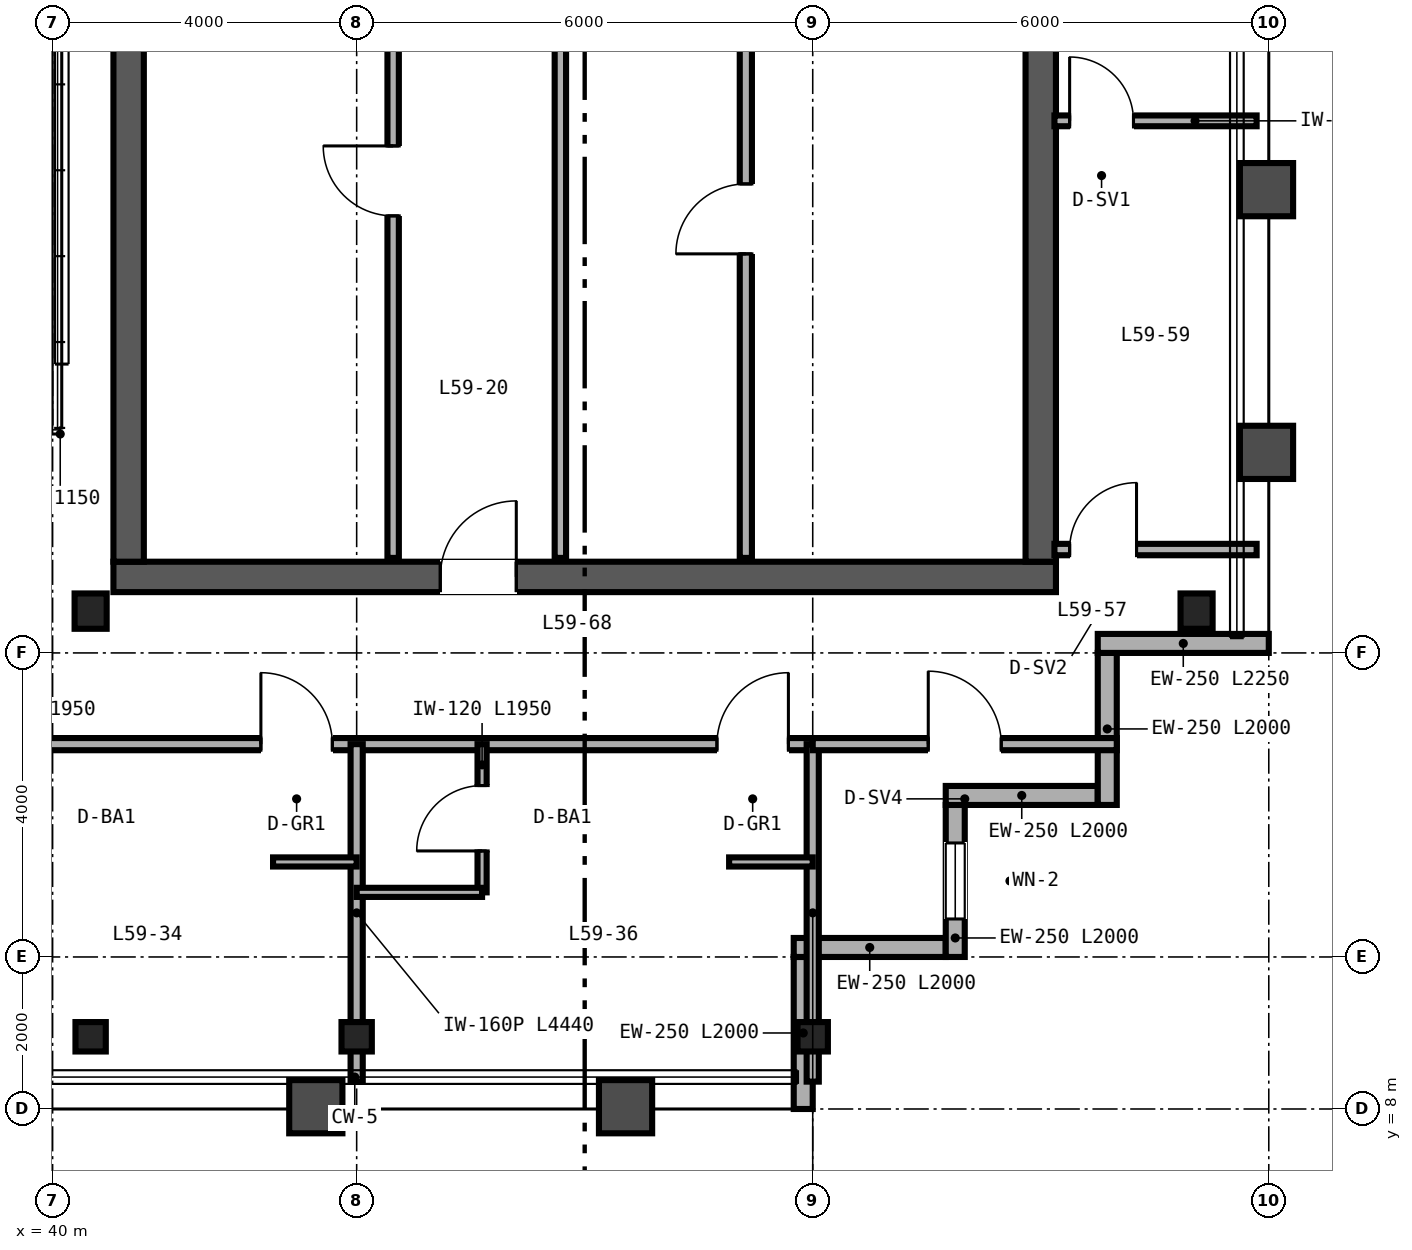
"""IFC4 building model, lengths in metres.
Left out: names, types, materials, properties, quantities, classifications, styles, units other than length and angle.
Written with IfcOpenShell. Run it as: python <this file> out.ifc"""

import sys

from ifc_helpers import new_model, si_unit, direction, frame, frame_2d, origin, origin_2d, place, context, subcontext, project, spatial, rectangle, i_section, extrude, source, transform, mapped, element, fill, save


model = new_model("IFC4")
c1 = context("Model", 3, precision=1e-05, world=origin(), true_north=direction((0.0, 1.0)))
c2 = subcontext(c1, "Body", "Model", "MODEL_VIEW")
j1 = project(units=[si_unit("LENGTHUNIT", "METRE"), si_unit("PLANEANGLEUNIT", "RADIAN")], contexts=[c1])
p1 = place(None, origin())
s1 = spatial("IfcSite", under=j1, at=p1, CompositionType="ELEMENT")
p2 = place(p1, origin())
s2 = spatial("IfcBuilding", under=s1, at=p2, CompositionType="ELEMENT")
p3 = place(p2, frame((0.0, 0.0, 236.4)))
s3 = spatial("IfcBuildingStorey", under=s2, at=p3, CompositionType="ELEMENT", Elevation=236.4)
p4 = place(p3, frame((40.8, 15.0, 0.0), z_axis=(0.0, 0.0, 1.0), x_axis=(1.0, 0.0, 0.0)))
e1 = element("IfcWall", 1, at=p4, inside=s3, PredefinedType="SHEAR", context=c2, shape_type="SweptSolid", body=[
    extrude(rectangle(XDim=12.4, YDim=0.4, at=frame_2d((6.2, 0.0))), origin(), (0.0, 0.0, 1.0), 3.38),
])
p5 = place(p4, frame((4.3, 0.0, 0.0)))
e2 = element("IfcOpeningElement", 2, at=p5, cuts=e1, PredefinedType="OPENING", context=c2, shape_type="SweptSolid", body=[
    extrude(rectangle(XDim=1.0, YDim=2.15, at=frame_2d((0.5, 1.075))), frame((0.0, 0.21, 0.0), z_axis=(0.0, -1.0, 0.0), x_axis=(1.0, 0.0, 0.0)), (0.0, 0.0, 1.0), 0.42),
])
for number, where, z_axis, x_axis in (
    (3, (41.0, 15.2, 0.0), (0.0, 0.0, 1.0), (0.0, 1.0, 0.0)),
    (4, (53.0, 15.2, 0.0), (0.0, 0.0, 1.0), (0.0, 1.0, 0.0)),
):
    element("IfcWall", number, at=place(p3, frame(where, z_axis=z_axis, x_axis=x_axis)), inside=s3, PredefinedType="SHEAR", context=c2, shape_type="SweptSolid", body=[
        extrude(rectangle(XDim=21.6, YDim=0.4, at=frame_2d((10.8, 0.0))), origin(), (0.0, 0.0, 1.0), 3.38),
    ])
m1 = source(origin(), c2, "Body", "SweptSolid", [
    extrude(i_section(OverallWidth=0.422, OverallDepth=0.465, WebThickness=0.045, FlangeThickness=0.073, FilletRadius=0.025, at=origin_2d()), origin(), (0.0, 0.0, 1.0), 3.38),
])
for number, where, z_axis, x_axis in (
    (5, (40.5, 14.55, 0.0), (0.0, 0.0, 1.0), (1.0, 0.0, 0.0)),
    (6, (55.05, 14.55, 0.0), (0.0, 0.0, 1.0), (1.0, 0.0, 0.0)),
):
    element("IfcColumn", number, at=place(p3, frame(where, z_axis=z_axis, x_axis=x_axis)), inside=s3, PredefinedType="COLUMN", context=c2, shape_type="MappedRepresentation", body=[
        mapped(m1, transform((0.0, 0.0, 0.0), scale=1.0)),
    ])
m2 = source(origin(), c2, "Body", "SweptSolid", [
    extrude(i_section(OverallWidth=0.399, OverallDepth=0.387, WebThickness=0.021, FlangeThickness=0.033, FilletRadius=0.025, at=origin_2d()), origin(), (0.0, 0.0, 1.0), 3.38),
])
for number, where, z_axis, x_axis in (
    (7, (40.5, 8.95, 0.0), (0.0, 0.0, 1.0), (1.0, 0.0, 0.0)),
    (8, (44.0, 8.95, 0.0), (0.0, 0.0, 1.0), (1.0, 0.0, 0.0)),
    (9, (50.0, 8.95, 0.0), (0.0, 0.0, 1.0), (1.0, 0.0, 0.0)),
):
    element("IfcColumn", number, at=place(p3, frame(where, z_axis=z_axis, x_axis=x_axis)), inside=s3, PredefinedType="COLUMN", context=c2, shape_type="MappedRepresentation", body=[
        mapped(m2, transform((0.0, 0.0, 0.0), scale=1.0)),
    ])
p6 = place(p3, frame((49.875, 8.0, 0.0), z_axis=(0.0, 0.0, 1.0), x_axis=(0.0, 1.0, 0.0)))
e10 = element("IfcWall", 10, at=p6, inside=s3, PredefinedType="SOLIDWALL", context=c2, shape_type="SweptSolid", body=[
    extrude(rectangle(XDim=2.0, YDim=0.25, at=frame_2d((1.0, 0.0))), origin(), (0.0, 0.0, 1.0), 2.687),
])
p7 = place(p3, frame((49.75, 10.125, 0.0), z_axis=(0.0, 0.0, 1.0), x_axis=(1.0, 0.0, 0.0)))
e11 = element("IfcWall", 11, at=p7, inside=s3, PredefinedType="SOLIDWALL", context=c2, shape_type="SweptSolid", body=[
    extrude(rectangle(XDim=2.0, YDim=0.25, at=frame_2d((1.0, 0.0))), origin(), (0.0, 0.0, 1.0), 3.38),
])
p8 = place(p3, frame((51.875, 10.0, 0.0), z_axis=(0.0, 0.0, 1.0), x_axis=(0.0, 1.0, 0.0)))
e12 = element("IfcWall", 12, at=p8, inside=s3, PredefinedType="SOLIDWALL", context=c2, shape_type="SweptSolid", body=[
    extrude(rectangle(XDim=2.0, YDim=0.25, at=frame_2d((1.0, 0.0))), origin(), (0.0, 0.0, 1.0), 3.38),
])
p9 = place(p8, frame((0.5, 0.0, 0.85)))
e13 = element("IfcOpeningElement", 13, at=p9, cuts=e12, PredefinedType="OPENING", context=c2, shape_type="SweptSolid", body=[
    extrude(rectangle(XDim=1.0, YDim=1.9, at=frame_2d((0.5, 0.95))), frame((0.0, 0.135, 0.0), z_axis=(0.0, -1.0, 0.0), x_axis=(1.0, 0.0, 0.0)), (0.0, 0.0, 1.0), 0.27),
])
for number, where, z_axis, x_axis in (
    (14, (51.75, 12.125, 0.0), (0.0, 0.0, 1.0), (1.0, 0.0, 0.0)),
    (15, (53.875, 12.0, 0.0), (0.0, 0.0, 1.0), (0.0, 1.0, 0.0)),
):
    element("IfcWall", number, at=place(p3, frame(where, z_axis=z_axis, x_axis=x_axis)), inside=s3, PredefinedType="SOLIDWALL", context=c2, shape_type="SweptSolid", body=[
        extrude(rectangle(XDim=2.0, YDim=0.25, at=frame_2d((1.0, 0.0))), origin(), (0.0, 0.0, 1.0), 3.38),
    ])
p10 = place(p3, frame((53.75, 14.125, 0.0), z_axis=(0.0, 0.0, 1.0), x_axis=(1.0, 0.0, 0.0)))
e16 = element("IfcWall", 16, at=p10, inside=s3, PredefinedType="SOLIDWALL", context=c2, shape_type="SweptSolid", body=[
    extrude(rectangle(XDim=2.25, YDim=0.25, at=frame_2d((1.125, 0.0))), origin(), (0.0, 0.0, 1.0), 3.38),
])
p11 = place(p3, frame((46.68, 15.25, 0.0), z_axis=(0.0, 0.0, 1.0), x_axis=(0.0, 1.0, 0.0)))
e17 = element("IfcWall", 17, at=p11, inside=s3, PredefinedType="PARTITIONING", context=c2, shape_type="SweptSolid", body=[
    extrude(rectangle(XDim=16.13, YDim=0.15, at=frame_2d((8.065, 0.0))), origin(), (0.0, 0.0, 1.0), 2.453),
])
p12 = place(p11, frame((7.5, 0.0, 0.0)))
e18 = element("IfcOpeningElement", 18, at=p12, cuts=e17, PredefinedType="OPENING", context=c2, shape_type="SweptSolid", body=[
    extrude(rectangle(XDim=0.9, YDim=2.15, at=frame_2d((0.45, 1.075))), frame((0.0, 0.085, 0.0), z_axis=(0.0, -1.0, 0.0), x_axis=(1.0, 0.0, 0.0)), (0.0, 0.0, 1.0), 0.17),
])
p13 = place(p3, frame((49.12, 15.25, 0.0), z_axis=(0.0, 0.0, 1.0), x_axis=(0.0, 1.0, 0.0)))
e19 = element("IfcWall", 19, at=p13, inside=s3, PredefinedType="PARTITIONING", context=c2, shape_type="SweptSolid", body=[
    extrude(rectangle(XDim=16.13, YDim=0.16, at=frame_2d((8.065, 0.0))), origin(), (0.0, 0.0, 1.0), 2.453),
])
p14 = place(p13, frame((4.0, 0.0, 0.0)))
e20 = element("IfcOpeningElement", 20, at=p14, cuts=e19, PredefinedType="OPENING", context=c2, shape_type="SweptSolid", body=[
    extrude(rectangle(XDim=0.92, YDim=2.15, at=frame_2d((0.46, 1.075))), frame((0.0, 0.09, 0.0), z_axis=(0.0, -1.0, 0.0), x_axis=(1.0, 0.0, 0.0)), (0.0, 0.0, 1.0), 0.18),
])
p15 = place(p13, frame((12.0, 0.0, 0.0)))
e21 = element("IfcOpeningElement", 21, at=p15, cuts=e19, PredefinedType="OPENING", context=c2, shape_type="SweptSolid", body=[
    extrude(rectangle(XDim=0.92, YDim=2.15, at=frame_2d((0.46, 1.075))), frame((0.0, 0.09, 0.0), z_axis=(0.0, -1.0, 0.0), x_axis=(1.0, 0.0, 0.0)), (0.0, 0.0, 1.0), 0.18),
])
p16 = place(p3, frame((44.48, 15.25, 0.0), z_axis=(0.0, 0.0, 1.0), x_axis=(0.0, 1.0, 0.0)))
e22 = element("IfcWall", 22, at=p16, inside=s3, PredefinedType="PARTITIONING", context=c2, shape_type="SweptSolid", body=[
    extrude(rectangle(XDim=16.13, YDim=0.15, at=frame_2d((8.065, 0.0))), origin(), (0.0, 0.0, 1.0), 2.453),
])
p17 = place(p16, frame((4.5, 0.0, 0.0)))
e23 = element("IfcOpeningElement", 23, at=p17, cuts=e22, PredefinedType="OPENING", context=c2, shape_type="SweptSolid", body=[
    extrude(rectangle(XDim=0.92, YDim=2.15, at=frame_2d((0.46, 1.075))), frame((0.0, 0.085, 0.0), z_axis=(0.0, -1.0, 0.0), x_axis=(1.0, 0.0, 0.0)), (0.0, 0.0, 1.0), 0.17),
])
p18 = place(p3, frame((38.0, 12.8, 0.0), z_axis=(0.0, 0.0, 1.0), x_axis=(1.0, 0.0, 0.0)))
e24 = element("IfcWall", 24, at=p18, inside=s3, PredefinedType="PARTITIONING", context=c2, shape_type="SweptSolid", body=[
    extrude(rectangle(XDim=12.0, YDim=0.16, at=frame_2d((6.0, 0.0))), origin(), (0.0, 0.0, 1.0), 2.923),
])
p19 = place(p18, frame((4.74, 0.0, 0.0)))
e25 = element("IfcOpeningElement", 25, at=p19, cuts=e24, PredefinedType="OPENING", context=c2, shape_type="SweptSolid", body=[
    extrude(rectangle(XDim=0.94, YDim=2.15, at=frame_2d((0.47, 1.075))), frame((0.0, 0.09, 0.0), z_axis=(0.0, -1.0, 0.0), x_axis=(1.0, 0.0, 0.0)), (0.0, 0.0, 1.0), 0.18),
])
p20 = place(p18, frame((10.74, 0.0, 0.0)))
e26 = element("IfcOpeningElement", 26, at=p20, cuts=e24, PredefinedType="OPENING", context=c2, shape_type="SweptSolid", body=[
    extrude(rectangle(XDim=0.94, YDim=2.15, at=frame_2d((0.47, 1.075))), frame((0.0, 0.09, 0.0), z_axis=(0.0, -1.0, 0.0), x_axis=(1.0, 0.0, 0.0)), (0.0, 0.0, 1.0), 0.18),
])
for number, where, z_axis, x_axis in (
    (27, (50.0, 8.36, 0.0), (0.0, 0.0, 1.0), (0.0, 1.0, 0.0)),
    (28, (44.0, 8.36, 0.0), (0.0, 0.0, 1.0), (0.0, 1.0, 0.0)),
):
    element("IfcWall", number, at=place(p3, frame(where, z_axis=z_axis, x_axis=x_axis)), inside=s3, PredefinedType="PARTITIONING", context=c2, shape_type="SweptSolid", body=[
        extrude(rectangle(XDim=4.44, YDim=0.16, at=frame_2d((2.22, 0.0))), origin(), (0.0, 0.0, 1.0), 2.687),
    ])
p21 = place(p3, frame((42.9, 11.25, 0.0), z_axis=(0.0, 0.0, 1.0), x_axis=(1.0, 0.0, 0.0)))
e29 = element("IfcWall", 29, at=p21, inside=s3, PredefinedType="PARTITIONING", context=c2, shape_type="SweptSolid", body=[
    extrude(rectangle(XDim=1.1, YDim=0.12, at=frame_2d((0.55, 0.0))), origin(), (0.0, 0.0, 1.0), 3.38),
])
p22 = place(p3, frame((45.65, 10.85, 0.0), z_axis=(0.0, 0.0, 1.0), x_axis=(0.0, 1.0, 0.0)))
e30 = element("IfcWall", 30, at=p22, inside=s3, PredefinedType="PARTITIONING", context=c2, shape_type="SweptSolid", body=[
    extrude(rectangle(XDim=1.95, YDim=0.12, at=frame_2d((0.975, 0.0))), origin(), (0.0, 0.0, 1.0), 3.38),
])
p23 = place(p22, frame((0.545, 0.0, 0.0)))
e31 = element("IfcOpeningElement", 31, at=p23, cuts=e30, PredefinedType="OPENING", context=c2, shape_type="SweptSolid", body=[
    extrude(rectangle(XDim=0.86, YDim=2.1, at=frame_2d((0.43, 1.05))), frame((0.0, 0.07, 0.0), z_axis=(0.0, -1.0, 0.0), x_axis=(1.0, 0.0, 0.0)), (0.0, 0.0, 1.0), 0.14),
])
p24 = place(p3, frame((44.0, 10.85, 0.0), z_axis=(0.0, 0.0, 1.0), x_axis=(1.0, 0.0, 0.0)))
e32 = element("IfcWall", 32, at=p24, inside=s3, PredefinedType="PARTITIONING", context=c2, shape_type="SweptSolid", body=[
    extrude(rectangle(XDim=1.65, YDim=0.12, at=frame_2d((0.825, 0.0))), origin(), (0.0, 0.0, 1.0), 3.38),
])
p25 = place(p3, frame((48.9, 11.25, 0.0), z_axis=(0.0, 0.0, 1.0), x_axis=(1.0, 0.0, 0.0)))
e33 = element("IfcWall", 33, at=p25, inside=s3, PredefinedType="PARTITIONING", context=c2, shape_type="SweptSolid", body=[
    extrude(rectangle(XDim=1.1, YDim=0.12, at=frame_2d((0.55, 0.0))), origin(), (0.0, 0.0, 1.0), 3.38),
])
p26 = place(p3, frame((53.18, 15.36, 0.0), z_axis=(0.0, 0.0, 1.0), x_axis=(1.0, 0.0, 0.0)))
e34 = element("IfcWall", 34, at=p26, inside=s3, PredefinedType="PARTITIONING", context=c2, shape_type="SweptSolid", body=[
    extrude(rectangle(XDim=2.66, YDim=0.15, at=frame_2d((1.33, 0.0))), origin(), (0.0, 0.0, 1.0), 2.601),
])
p27 = place(p26, frame((0.2, 0.0, 0.0)))
e35 = element("IfcOpeningElement", 35, at=p27, cuts=e34, PredefinedType="OPENING", context=c2, shape_type="SweptSolid", body=[
    extrude(rectangle(XDim=0.88, YDim=2.15, at=frame_2d((0.44, 1.075))), frame((0.0, 0.085, 0.0), z_axis=(0.0, -1.0, 0.0), x_axis=(1.0, 0.0, 0.0)), (0.0, 0.0, 1.0), 0.17),
])
p28 = place(p3, frame((53.18, 21.0, 0.0), z_axis=(0.0, 0.0, 1.0), x_axis=(1.0, 0.0, 0.0)))
e36 = element("IfcWall", 36, at=p28, inside=s3, PredefinedType="PARTITIONING", context=c2, shape_type="SweptSolid", body=[
    extrude(rectangle(XDim=2.66, YDim=0.142, at=frame_2d((1.33, 0.0))), origin(), (0.0, 0.0, 1.0), 2.601),
])
p29 = place(p28, frame((0.2, 0.0, 0.0)))
e37 = element("IfcOpeningElement", 37, at=p29, cuts=e36, PredefinedType="OPENING", context=c2, shape_type="SweptSolid", body=[
    extrude(rectangle(XDim=0.84, YDim=2.1, at=frame_2d((0.42, 1.05))), frame((0.0, 0.081, 0.0), z_axis=(0.0, -1.0, 0.0), x_axis=(1.0, 0.0, 0.0)), (0.0, 0.0, 1.0), 0.162),
])
p30 = place(p3, frame((50.0, 12.8, 0.0), z_axis=(0.0, 0.0, 1.0), x_axis=(1.0, 0.0, 0.0)))
e38 = element("IfcWall", 38, at=p30, inside=s3, PredefinedType="PARTITIONING", context=c2, shape_type="SweptSolid", body=[
    extrude(rectangle(XDim=4.0, YDim=0.16, at=frame_2d((2.0, 0.0))), origin(), (0.0, 0.0, 1.0), 3.38),
])
p31 = place(p30, frame((1.52, 0.0, 0.0)))
e39 = element("IfcOpeningElement", 39, at=p31, cuts=e38, PredefinedType="OPENING", context=c2, shape_type="SweptSolid", body=[
    extrude(rectangle(XDim=0.96, YDim=2.15, at=frame_2d((0.48, 1.075))), frame((0.0, 0.09, 0.0), z_axis=(0.0, -1.0, 0.0), x_axis=(1.0, 0.0, 0.0)), (0.0, 0.0, 1.0), 0.18),
])
m3 = source(origin(), c2, "Body", "SweptSolid", [
    extrude(rectangle(XDim=1.0, YDim=1.9, at=frame_2d((0.5, 0.95))), frame((0.0, 0.03, 0.0), z_axis=(0.0, -1.0, 0.0), x_axis=(1.0, 0.0, 0.0)), (0.0, 0.0, 1.0), 0.06),
])
p32 = place(p9, origin())
e40 = element("IfcWindow", 40, at=p32, inside=s3, PartitioningType="SINGLE_PANEL", PredefinedType="WINDOW", context=c2, shape_type="MappedRepresentation", body=[
    mapped(m3, transform((0.0, 0.0, 0.0), scale=1.0)),
])
fill(e13, e40)
m4 = source(origin(), c2, "Body", "SweptSolid", [
    extrude(rectangle(XDim=1.0, YDim=2.15, at=frame_2d((0.5, 1.075))), frame((0.0, 0.025, 0.0), z_axis=(0.0, -1.0, 0.0), x_axis=(1.0, 0.0, 0.0)), (0.0, 0.0, 1.0), 0.05),
])
p33 = place(p5, origin())
e41 = element("IfcDoor", 41, at=p33, inside=s3, OperationType="SINGLE_SWING_RIGHT", PredefinedType="DOOR", context=c2, shape_type="MappedRepresentation", body=[
    mapped(m4, transform((0.0, 0.0, 0.0), scale=1.0)),
])
fill(e2, e41)
m5 = source(origin(), c2, "Body", "SweptSolid", [
    extrude(rectangle(XDim=0.92, YDim=2.15, at=frame_2d((0.46, 1.075))), frame((0.0, 0.025, 0.0), z_axis=(0.0, -1.0, 0.0), x_axis=(1.0, 0.0, 0.0)), (0.0, 0.0, 1.0), 0.05),
])
p34 = place(p14, origin())
e42 = element("IfcDoor", 42, at=p34, inside=s3, OperationType="SINGLE_SWING_LEFT", PredefinedType="DOOR", context=c2, shape_type="MappedRepresentation", body=[
    mapped(m5, transform((0.0, 0.0, 0.0), scale=1.0)),
])
fill(e20, e42)
p35 = place(p17, origin())
e43 = element("IfcDoor", 43, at=p35, inside=s3, OperationType="SINGLE_SWING_RIGHT", PredefinedType="DOOR", context=c2, shape_type="MappedRepresentation", body=[
    mapped(m5, transform((0.0, 0.0, 0.0), scale=1.0)),
])
fill(e23, e43)
m6 = source(origin(), c2, "Body", "SweptSolid", [
    extrude(rectangle(XDim=0.86, YDim=2.1, at=frame_2d((0.43, 1.05))), frame((0.0, 0.025, 0.0), z_axis=(0.0, -1.0, 0.0), x_axis=(1.0, 0.0, 0.0)), (0.0, 0.0, 1.0), 0.05),
])
p36 = place(p23, origin())
e44 = element("IfcDoor", 44, at=p36, inside=s3, OperationType="SINGLE_SWING_LEFT", PredefinedType="DOOR", context=c2, shape_type="MappedRepresentation", body=[
    mapped(m6, transform((0.0, 0.0, 0.0), scale=1.0)),
])
fill(e31, e44)
m7 = source(origin(), c2, "Body", "SweptSolid", [
    extrude(rectangle(XDim=0.94, YDim=2.15, at=frame_2d((0.47, 1.075))), frame((0.0, 0.025, 0.0), z_axis=(0.0, -1.0, 0.0), x_axis=(1.0, 0.0, 0.0)), (0.0, 0.0, 1.0), 0.05),
])
p37 = place(p19, origin())
e45 = element("IfcDoor", 45, at=p37, inside=s3, OperationType="SINGLE_SWING_LEFT", PredefinedType="DOOR", context=c2, shape_type="MappedRepresentation", body=[
    mapped(m7, transform((0.0, 0.0, 0.0), scale=1.0)),
])
fill(e25, e45)
p38 = place(p20, origin())
e46 = element("IfcDoor", 46, at=p38, inside=s3, OperationType="SINGLE_SWING_RIGHT", PredefinedType="DOOR", context=c2, shape_type="MappedRepresentation", body=[
    mapped(m7, transform((0.0, 0.0, 0.0), scale=1.0)),
])
fill(e26, e46)
m8 = source(origin(), c2, "Body", "SweptSolid", [
    extrude(rectangle(XDim=0.88, YDim=2.15, at=frame_2d((0.44, 1.075))), frame((0.0, 0.025, 0.0), z_axis=(0.0, -1.0, 0.0), x_axis=(1.0, 0.0, 0.0)), (0.0, 0.0, 1.0), 0.05),
])
p39 = place(p27, origin())
e47 = element("IfcDoor", 47, at=p39, inside=s3, OperationType="SINGLE_SWING_RIGHT", PredefinedType="DOOR", context=c2, shape_type="MappedRepresentation", body=[
    mapped(m8, transform((0.0, 0.0, 0.0), scale=1.0)),
])
fill(e35, e47)
m9 = source(origin(), c2, "Body", "SweptSolid", [
    extrude(rectangle(XDim=0.84, YDim=2.1, at=frame_2d((0.42, 1.05))), frame((0.0, 0.025, 0.0), z_axis=(0.0, -1.0, 0.0), x_axis=(1.0, 0.0, 0.0)), (0.0, 0.0, 1.0), 0.05),
])
p40 = place(p29, origin())
e48 = element("IfcDoor", 48, at=p40, inside=s3, OperationType="SINGLE_SWING_LEFT", PredefinedType="DOOR", context=c2, shape_type="MappedRepresentation", body=[
    mapped(m9, transform((0.0, 0.0, 0.0), scale=1.0)),
])
fill(e37, e48)
m10 = source(origin(), c2, "Body", "SweptSolid", [
    extrude(rectangle(XDim=0.96, YDim=2.15, at=frame_2d((0.48, 1.075))), frame((0.0, 0.025, 0.0), z_axis=(0.0, -1.0, 0.0), x_axis=(1.0, 0.0, 0.0)), (0.0, 0.0, 1.0), 0.05),
])
p41 = place(p31, origin())
e49 = element("IfcDoor", 49, at=p41, inside=s3, OperationType="SINGLE_SWING_LEFT", PredefinedType="DOOR", context=c2, shape_type="MappedRepresentation", body=[
    mapped(m10, transform((0.0, 0.0, 0.0), scale=1.0)),
])
fill(e39, e49)
save(model, sys.argv[1])
